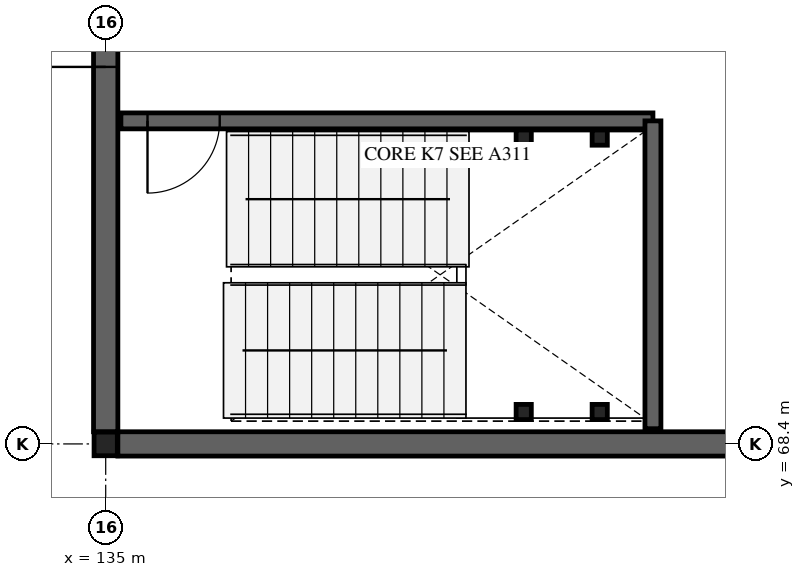
"""IFC4 building model, lengths in metres.
Left out: names, types, materials, properties, quantities, classifications, styles, units other than length and angle.
Written with IfcOpenShell. Run it as: python <this file> out.ifc"""

import sys

from ifc_helpers import new_model, si_unit, direction, frame, frame_2d, origin, origin_2d, place, context, subcontext, project, spatial, rectangle, hollow_rectangle, i_section, extrude, element, fill, save


model = new_model("IFC4")
c1 = context("Model", 3, precision=1e-05, world=origin(), true_north=direction((0.0, 1.0)))
c2 = subcontext(c1, "Body", "Model", "MODEL_VIEW")
j1 = project(units=[si_unit("LENGTHUNIT", "METRE"), si_unit("PLANEANGLEUNIT", "RADIAN")], contexts=[c1])
p1 = place(None, origin())
s1 = spatial("IfcSite", under=j1, at=p1, CompositionType="ELEMENT")
p2 = place(p1, origin())
s2 = spatial("IfcBuilding", under=s1, at=p2, CompositionType="ELEMENT")
p3 = place(p2, frame((0.0, 0.0, 9.36)))
s3 = spatial("IfcBuildingStorey", under=s2, at=p3, CompositionType="ELEMENT", Elevation=9.36)
p4 = place(p3, frame((135.0, 68.4, 0.0), z_axis=(0.0, 0.0, 1.0), x_axis=(1.0, 0.0, 0.0)))
e1 = element("IfcColumn", 1, at=p4, inside=s3, PredefinedType="COLUMN", context=c2, shape_type="SweptSolid", body=[
    extrude(i_section(OverallWidth=0.306, OverallDepth=0.311, WebThickness=0.011, FlangeThickness=0.017, FilletRadius=0.015, at=origin_2d()), origin(), (0.0, 0.0, 1.0), 4.32),
])
p5 = place(p3, frame((135.16, 68.4, 0.0), z_axis=(0.0, 0.0, 1.0), x_axis=(1.0, 0.0, 0.0)))
e2 = element("IfcWall", 2, at=p5, inside=s3, PredefinedType="SHEAR", context=c2, shape_type="SweptSolid", body=[
    extrude(rectangle(XDim=8.68, YDim=0.32, at=frame_2d((4.34, 0.0))), origin(), (0.0, 0.0, 1.0), 4.04),
])
p6 = place(p3, frame((135.0, 68.56, 0.0), z_axis=(0.0, 0.0, 1.0), x_axis=(0.0, 1.0, 0.0)))
e3 = element("IfcWall", 3, at=p6, inside=s3, PredefinedType="SHEAR", context=c2, shape_type="SweptSolid", body=[
    extrude(rectangle(XDim=7.28, YDim=0.32, at=frame_2d((3.64, 0.0))), origin(), (0.0, 0.0, 1.0), 4.04),
])
p7 = place(p6, frame((4.8, 0.0, 0.0)))
e4 = element("IfcOpeningElement", 4, at=p7, cuts=e3, PredefinedType="OPENING", context=c2, shape_type="SweptSolid", body=[
    extrude(rectangle(XDim=1.0, YDim=2.15, at=frame_2d((0.5, 1.075))), frame((0.0, 0.17, 0.0), z_axis=(0.0, -1.0, 0.0), x_axis=(1.0, 0.0, 0.0)), (0.0, 0.0, 1.0), 0.34),
])
p8 = place(p3, frame((135.2, 72.65, 0.0), z_axis=(0.0, 0.0, 1.0), x_axis=(1.0, 0.0, 0.0)))
e5 = element("IfcWall", 5, at=p8, inside=s3, PredefinedType="SOLIDWALL", context=c2, shape_type="SweptSolid", body=[
    extrude(rectangle(XDim=7.0, YDim=0.21, at=frame_2d((3.5, 0.0))), origin(), (0.0, 0.0, 1.0), 4.04),
])
p9 = place(p8, frame((0.35, 0.0, 0.0)))
e6 = element("IfcOpeningElement", 6, at=p9, cuts=e5, PredefinedType="OPENING", context=c2, shape_type="SweptSolid", body=[
    extrude(rectangle(XDim=0.95, YDim=2.12, at=frame_2d((0.475, 1.06))), frame((0.0, 0.115, 0.0), z_axis=(0.0, -1.0, 0.0), x_axis=(1.0, 0.0, 0.0)), (0.0, 0.0, 1.0), 0.23),
])
p10 = place(p3, frame((142.2, 68.6, 0.0), z_axis=(0.0, 0.0, 1.0), x_axis=(0.0, 1.0, 0.0)))
e7 = element("IfcWall", 7, at=p10, inside=s3, PredefinedType="SOLIDWALL", context=c2, shape_type="SweptSolid", body=[
    extrude(rectangle(XDim=4.05, YDim=0.21, at=frame_2d((2.025, 0.0))), origin(), (0.0, 0.0, 1.0), 4.04),
])
for number, where, z_axis, x_axis in (
    (8, (140.5, 68.82, 0.0), (0.0, 0.0, 1.0), (1.0, 0.0, 0.0)),
    (9, (140.5, 72.43, 0.0), (0.0, 0.0, 1.0), (1.0, 0.0, 0.0)),
    (10, (141.5, 68.82, 0.0), (0.0, 0.0, 1.0), (1.0, 0.0, 0.0)),
    (11, (141.5, 72.43, 0.0), (0.0, 0.0, 1.0), (1.0, 0.0, 0.0)),
):
    element("IfcColumn", number, at=place(p3, frame(where, z_axis=z_axis, x_axis=x_axis)), inside=s3, PredefinedType="COLUMN", context=c2, shape_type="SweptSolid", body=[
        extrude(hollow_rectangle(XDim=0.2, YDim=0.2, WallThickness=0.012, at=origin_2d()), origin(), (0.0, 0.0, 1.0), 4.32),
    ])
p11 = place(p9, origin())
e12 = element("IfcDoor", 12, at=p11, inside=s3, OperationType="SINGLE_SWING_RIGHT", PredefinedType="DOOR", context=c2, shape_type="SweptSolid", body=[
    extrude(rectangle(XDim=0.95, YDim=2.12, at=frame_2d((0.475, 1.06))), frame((0.0, 0.025, 0.0), z_axis=(0.0, -1.0, 0.0), x_axis=(1.0, 0.0, 0.0)), (0.0, 0.0, 1.0), 0.05),
])
fill(e6, e12)
p12 = place(p7, origin())
e13 = element("IfcDoor", 13, at=p12, inside=s3, OperationType="SINGLE_SWING_LEFT", PredefinedType="DOOR", context=c2, shape_type="SweptSolid", body=[
    extrude(rectangle(XDim=1.0, YDim=2.15, at=frame_2d((0.5, 1.075))), frame((0.0, 0.025, 0.0), z_axis=(0.0, -1.0, 0.0), x_axis=(1.0, 0.0, 0.0)), (0.0, 0.0, 1.0), 0.05),
])
fill(e4, e13)
save(model, sys.argv[1])
